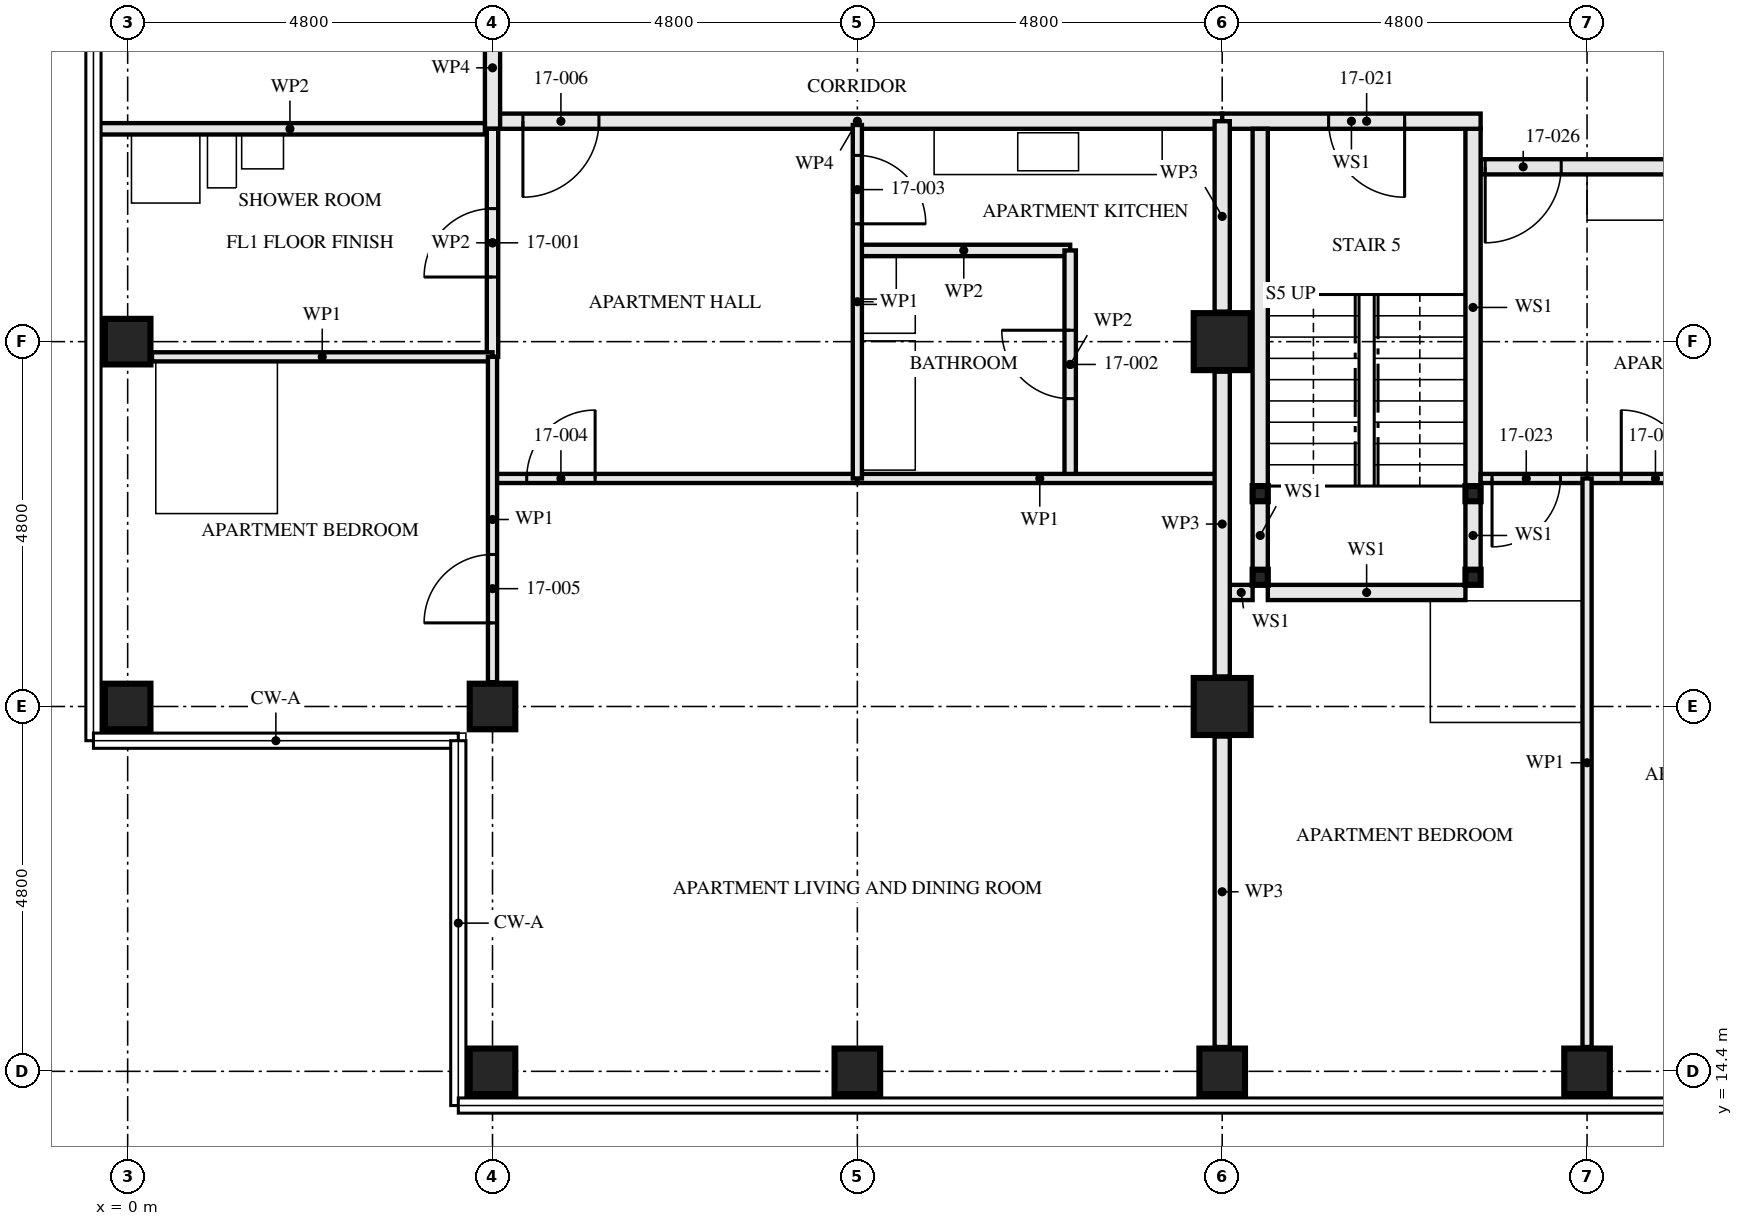
"""IFC4 building model, lengths in metres.
Left out: names, types, materials, properties, quantities, classifications, styles, units other than length and angle.
Written with IfcOpenShell. Run it as: python <this file> out.ifc"""

import sys

from ifc_helpers import new_model, si_unit, direction, frame, frame_2d, origin, origin_2d, place, context, subcontext, project, spatial, rectangle, hollow_rectangle, extrude, element, fill, save


model = new_model("IFC4")
c1 = context("Model", 3, precision=1e-05, world=origin(), true_north=direction((0.0, 1.0)))
c2 = subcontext(c1, "Body", "Model", "MODEL_VIEW")
j1 = project(units=[si_unit("LENGTHUNIT", "METRE"), si_unit("PLANEANGLEUNIT", "RADIAN")], contexts=[c1])
p1 = place(None, origin())
s1 = spatial("IfcSite", under=j1, at=p1, CompositionType="ELEMENT")
p2 = place(p1, origin())
s2 = spatial("IfcBuilding", under=s1, at=p2, CompositionType="ELEMENT")
p3 = place(p2, frame((0.0, 0.0, 65.5)))
s3 = spatial("IfcBuildingStorey", under=s2, at=p3, CompositionType="ELEMENT", Elevation=65.5)
for number, where, z_axis, x_axis in (
    (1, (0.0, 19.2, 0.0), (0.0, 0.0, 1.0), (0.0, 1.0, 0.0)),
    (2, (0.0, 24.0, 0.0), (0.0, 0.0, 1.0), (1.0, 0.0, 0.0)),
    (3, (4.8, 14.4, 0.0), (0.0, 0.0, 1.0), (0.0, 1.0, 0.0)),
    (4, (4.8, 19.2, 0.0), (0.0, 0.0, 1.0), (0.0, 1.0, 0.0)),
    (5, (9.6, 14.4, 0.0), (0.0, 0.0, 1.0), (0.0, 1.0, 0.0)),
    (6, (14.4, 14.4, 0.0), (0.0, 0.0, 1.0), (0.0, 1.0, 0.0)),
):
    element("IfcColumn", number, at=place(p3, frame(where, z_axis=z_axis, x_axis=x_axis)), inside=s3, PredefinedType="COLUMN", context=c2, shape_type="SweptSolid", body=[
        extrude(hollow_rectangle(XDim=0.6, YDim=0.6, WallThickness=0.08, at=origin_2d()), origin(), (0.0, 0.0, 1.0), 3.5),
    ])
for number, where, z_axis, x_axis in (
    (7, (14.4, 19.2, 0.0), (0.0, 0.0, 1.0), (1.0, 0.0, 0.0)),
    (8, (14.4, 24.0, 0.0), (0.0, 0.0, 1.0), (1.0, 0.0, 0.0)),
):
    element("IfcColumn", number, at=place(p3, frame(where, z_axis=z_axis, x_axis=x_axis)), inside=s3, PredefinedType="COLUMN", context=c2, shape_type="SweptSolid", body=[
        extrude(hollow_rectangle(XDim=0.75, YDim=0.75, WallThickness=0.08, at=origin_2d()), origin(), (0.0, 0.0, 1.0), 3.5),
    ])
p4 = place(p3, frame((19.2, 14.4, 0.0), z_axis=(0.0, 0.0, 1.0), x_axis=(0.0, 1.0, 0.0)))
e9 = element("IfcColumn", 9, at=p4, inside=s3, PredefinedType="COLUMN", context=c2, shape_type="SweptSolid", body=[
    extrude(hollow_rectangle(XDim=0.6, YDim=0.6, WallThickness=0.08, at=origin_2d()), origin(), (0.0, 0.0, 1.0), 3.5),
])
for number, where, z_axis, x_axis in (
    (10, (14.9, 20.9, 0.0), (0.0, 0.0, 1.0), (1.0, 0.0, 0.0)),
    (11, (17.7, 20.9, 0.0), (0.0, 0.0, 1.0), (1.0, 0.0, 0.0)),
    (12, (14.9, 22.0, 0.0), (0.0, 0.0, 1.0), (1.0, 0.0, 0.0)),
    (13, (17.7, 22.0, 0.0), (0.0, 0.0, 1.0), (1.0, 0.0, 0.0)),
):
    element("IfcColumn", number, at=place(p3, frame(where, z_axis=z_axis, x_axis=x_axis)), inside=s3, PredefinedType="COLUMN", context=c2, shape_type="SweptSolid", body=[
        extrude(hollow_rectangle(XDim=0.2, YDim=0.2, WallThickness=0.008, at=origin_2d()), origin(), (0.0, 0.0, 1.0), 3.33),
    ])
p5 = place(p3, frame((4.8, 23.8, 0.0), z_axis=(0.0, 0.0, 1.0), x_axis=(0.0, 1.0, 0.0)))
e14 = element("IfcWall", 14, at=p5, inside=s3, PredefinedType="PARTITIONING", context=c2, shape_type="SweptSolid", body=[
    extrude(rectangle(XDim=3.0, YDim=0.15, at=frame_2d((1.5, 0.0))), origin(), (0.0, 0.0, 1.0), 2.55),
])
p6 = place(p5, frame((1.05, 0.0, 0.0)))
e15 = element("IfcOpeningElement", 15, at=p6, cuts=e14, PredefinedType="OPENING", context=c2, shape_type="SweptSolid", body=[
    extrude(rectangle(XDim=0.9, YDim=2.1, at=frame_2d((0.45, 1.05))), frame((0.0, 0.085, 0.0), z_axis=(0.0, -1.0, 0.0), x_axis=(1.0, 0.0, 0.0)), (0.0, 0.0, 1.0), 0.171),
])
p7 = place(p3, frame((12.4, 22.2, 0.0), z_axis=(0.0, 0.0, 1.0), x_axis=(0.0, 1.0, 0.0)))
e16 = element("IfcWall", 16, at=p7, inside=s3, PredefinedType="PARTITIONING", context=c2, shape_type="SweptSolid", body=[
    extrude(rectangle(XDim=3.0, YDim=0.15, at=frame_2d((1.5, 0.0))), origin(), (0.0, 0.0, 1.0), 2.55),
])
p8 = place(p7, frame((1.05, 0.0, 0.0)))
e17 = element("IfcOpeningElement", 17, at=p8, cuts=e16, PredefinedType="OPENING", context=c2, shape_type="SweptSolid", body=[
    extrude(rectangle(XDim=0.9, YDim=2.1, at=frame_2d((0.45, 1.05))), frame((0.0, 0.085, 0.0), z_axis=(0.0, -1.0, 0.0), x_axis=(1.0, 0.0, 0.0)), (0.0, 0.0, 1.0), 0.171),
])
p9 = place(p3, frame((9.6, 25.2, 0.0), z_axis=(0.0, 0.0, 1.0), x_axis=(1.0, 0.0, 0.0)))
e18 = element("IfcWall", 18, at=p9, inside=s3, PredefinedType="PARTITIONING", context=c2, shape_type="SweptSolid", body=[
    extrude(rectangle(XDim=2.8, YDim=0.15, at=frame_2d((1.4, 0.0))), origin(), (0.0, 0.0, 1.0), 3.33),
])
p10 = place(p3, frame((9.6, 22.2, 0.0), z_axis=(0.0, 0.0, 1.0), x_axis=(0.0, 1.0, 0.0)))
e19 = element("IfcWall", 19, at=p10, inside=s3, PredefinedType="PARTITIONING", context=c2, shape_type="SweptSolid", body=[
    extrude(rectangle(XDim=4.65, YDim=0.12, at=frame_2d((2.325, 0.0))), origin(), (0.0, 0.0, 1.0), 2.55),
])
p11 = place(p10, frame((3.35, 0.0, 0.0)))
e20 = element("IfcOpeningElement", 20, at=p11, cuts=e19, PredefinedType="OPENING", context=c2, shape_type="SweptSolid", body=[
    extrude(rectangle(XDim=0.9, YDim=2.1, at=frame_2d((0.45, 1.05))), frame((0.0, 0.071, 0.0), z_axis=(0.0, -1.0, 0.0), x_axis=(1.0, 0.0, 0.0)), (0.0, 0.0, 1.0), 0.141),
])
p12 = place(p3, frame((0.32, 23.8, 0.0), z_axis=(0.0, 0.0, 1.0), x_axis=(1.0, 0.0, 0.0)))
e21 = element("IfcWall", 21, at=p12, inside=s3, PredefinedType="PARTITIONING", context=c2, shape_type="SweptSolid", body=[
    extrude(rectangle(XDim=4.48, YDim=0.12, at=frame_2d((2.24, 0.0))), origin(), (0.0, 0.0, 1.0), 3.33),
])
p13 = place(p3, frame((4.8, 22.2, 0.0), z_axis=(0.0, 0.0, 1.0), x_axis=(1.0, 0.0, 0.0)))
e22 = element("IfcWall", 22, at=p13, inside=s3, PredefinedType="PARTITIONING", context=c2, shape_type="SweptSolid", body=[
    extrude(rectangle(XDim=4.8, YDim=0.12, at=frame_2d((2.4, 0.0))), origin(), (0.0, 0.0, 1.0), 3.33),
])
p14 = place(p13, frame((0.45, 0.0, 0.0)))
e23 = element("IfcOpeningElement", 23, at=p14, cuts=e22, PredefinedType="OPENING", context=c2, shape_type="SweptSolid", body=[
    extrude(rectangle(XDim=0.9, YDim=2.1, at=frame_2d((0.45, 1.05))), frame((0.0, 0.071, 0.0), z_axis=(0.0, -1.0, 0.0), x_axis=(1.0, 0.0, 0.0)), (0.0, 0.0, 1.0), 0.141),
])
p15 = place(p3, frame((9.6, 22.2, 0.0), z_axis=(0.0, 0.0, 1.0), x_axis=(1.0, 0.0, 0.0)))
e24 = element("IfcWall", 24, at=p15, inside=s3, PredefinedType="PARTITIONING", context=c2, shape_type="SweptSolid", body=[
    extrude(rectangle(XDim=4.8, YDim=0.12, at=frame_2d((2.4, 0.0))), origin(), (0.0, 0.0, 1.0), 3.33),
])
p16 = place(p3, frame((4.8, 19.52, 0.0), z_axis=(0.0, 0.0, 1.0), x_axis=(0.0, 1.0, 0.0)))
e25 = element("IfcWall", 25, at=p16, inside=s3, PredefinedType="PARTITIONING", context=c2, shape_type="SweptSolid", body=[
    extrude(rectangle(XDim=4.28, YDim=0.12, at=frame_2d((2.14, 0.0))), origin(), (0.0, 0.0, 1.0), 3.33),
])
p17 = place(p16, frame((0.78, 0.0, 0.0)))
e26 = element("IfcOpeningElement", 26, at=p17, cuts=e25, PredefinedType="OPENING", context=c2, shape_type="SweptSolid", body=[
    extrude(rectangle(XDim=0.9, YDim=2.1, at=frame_2d((0.45, 1.05))), frame((0.0, 0.071, 0.0), z_axis=(0.0, -1.0, 0.0), x_axis=(1.0, 0.0, 0.0)), (0.0, 0.0, 1.0), 0.141),
])
p18 = place(p3, frame((4.8, 26.9, 0.0), z_axis=(0.0, 0.0, 1.0), x_axis=(1.0, 0.0, 0.0)))
e27 = element("IfcWall", 27, at=p18, inside=s3, PredefinedType="PARTITIONING", context=c2, shape_type="SweptSolid", body=[
    extrude(rectangle(XDim=9.6, YDim=0.2, at=frame_2d((4.8, 0.0))), origin(), (0.0, 0.0, 1.0), 3.33),
])
p19 = place(p18, frame((0.4, 0.0, 0.0)))
e28 = element("IfcOpeningElement", 28, at=p19, cuts=e27, PredefinedType="OPENING", context=c2, shape_type="SweptSolid", body=[
    extrude(rectangle(XDim=1.0, YDim=2.1, at=frame_2d((0.5, 1.05))), frame((0.0, 0.111, 0.0), z_axis=(0.0, -1.0, 0.0), x_axis=(1.0, 0.0, 0.0)), (0.0, 0.0, 1.0), 0.221),
])
p20 = place(p3, frame((4.8, 26.8, 0.0), z_axis=(0.0, 0.0, 1.0), x_axis=(0.0, 1.0, 0.0)))
e29 = element("IfcWall", 29, at=p20, inside=s3, PredefinedType="PARTITIONING", context=c2, shape_type="SweptSolid", body=[
    extrude(rectangle(XDim=1.605, YDim=0.2, at=frame_2d((0.802, 0.0))), origin(), (0.0, 0.0, 1.0), 3.33),
])
p21 = place(p3, frame((14.9, 21.0, 0.0), z_axis=(0.0, 0.0, 1.0), x_axis=(0.0, 1.0, 0.0)))
e30 = element("IfcWall", 30, at=p21, inside=s3, PredefinedType="SOLIDWALL", context=c2, shape_type="SweptSolid", body=[
    extrude(rectangle(XDim=0.9, YDim=0.2, at=frame_2d((0.45, 0.0))), origin(), (0.0, 0.0, 1.0), 2.99),
])
p22 = place(p3, frame((14.9, 22.1, 0.0), z_axis=(0.0, 0.0, 1.0), x_axis=(0.0, 1.0, 0.0)))
e31 = element("IfcWall", 31, at=p22, inside=s3, PredefinedType="SOLIDWALL", context=c2, shape_type="SweptSolid", body=[
    extrude(rectangle(XDim=4.7, YDim=0.2, at=frame_2d((2.35, 0.0))), origin(), (0.0, 0.0, 1.0), 2.99),
])
p23 = place(p3, frame((17.7, 21.0, 0.0), z_axis=(0.0, 0.0, 1.0), x_axis=(0.0, 1.0, 0.0)))
e32 = element("IfcWall", 32, at=p23, inside=s3, PredefinedType="SOLIDWALL", context=c2, shape_type="SweptSolid", body=[
    extrude(rectangle(XDim=0.9, YDim=0.2, at=frame_2d((0.45, 0.0))), origin(), (0.0, 0.0, 1.0), 2.99),
])
p24 = place(p3, frame((17.7, 22.1, 0.0), z_axis=(0.0, 0.0, 1.0), x_axis=(0.0, 1.0, 0.0)))
e33 = element("IfcWall", 33, at=p24, inside=s3, PredefinedType="SOLIDWALL", context=c2, shape_type="SweptSolid", body=[
    extrude(rectangle(XDim=4.7, YDim=0.2, at=frame_2d((2.35, 0.0))), origin(), (0.0, 0.0, 1.0), 2.99),
])
p25 = place(p3, frame((14.5, 20.7, 0.0), z_axis=(0.0, 0.0, 1.0), x_axis=(1.0, 0.0, 0.0)))
e34 = element("IfcWall", 34, at=p25, inside=s3, PredefinedType="SOLIDWALL", context=c2, shape_type="SweptSolid", body=[
    extrude(rectangle(XDim=0.3, YDim=0.2, at=frame_2d((0.15, 0.0))), origin(), (0.0, 0.0, 1.0), 3.33),
])
p26 = place(p3, frame((15.0, 20.7, 0.0), z_axis=(0.0, 0.0, 1.0), x_axis=(1.0, 0.0, 0.0)))
e35 = element("IfcWall", 35, at=p26, inside=s3, PredefinedType="SOLIDWALL", context=c2, shape_type="SweptSolid", body=[
    extrude(rectangle(XDim=2.6, YDim=0.2, at=frame_2d((1.3, 0.0))), origin(), (0.0, 0.0, 1.0), 3.33),
])
p27 = place(p3, frame((14.4, 26.9, 0.0), z_axis=(0.0, 0.0, 1.0), x_axis=(1.0, 0.0, 0.0)))
e36 = element("IfcWall", 36, at=p27, inside=s3, PredefinedType="SOLIDWALL", context=c2, shape_type="SweptSolid", body=[
    extrude(rectangle(XDim=3.4, YDim=0.2, at=frame_2d((1.7, 0.0))), origin(), (0.0, 0.0, 1.0), 3.33),
])
p28 = place(p27, frame((1.4, 0.0, 0.0)))
e37 = element("IfcOpeningElement", 37, at=p28, cuts=e36, PredefinedType="OPENING", context=c2, shape_type="SweptSolid", body=[
    extrude(rectangle(XDim=1.0, YDim=2.1, at=frame_2d((0.5, 1.05))), frame((0.0, 0.111, 0.0), z_axis=(0.0, -1.0, 0.0), x_axis=(1.0, 0.0, 0.0)), (0.0, 0.0, 1.0), 0.221),
])
p29 = place(p3, frame((17.8, 22.2, 0.0), z_axis=(0.0, 0.0, 1.0), x_axis=(1.0, 0.0, 0.0)))
e38 = element("IfcWall", 38, at=p29, inside=s3, PredefinedType="PARTITIONING", context=c2, shape_type="SweptSolid", body=[
    extrude(rectangle(XDim=1.4, YDim=0.12, at=frame_2d((0.7, 0.0))), origin(), (0.0, 0.0, 1.0), 3.33),
])
p30 = place(p29, frame((0.15, 0.0, 0.0)))
e39 = element("IfcOpeningElement", 39, at=p30, cuts=e38, PredefinedType="OPENING", context=c2, shape_type="SweptSolid", body=[
    extrude(rectangle(XDim=0.9, YDim=2.1, at=frame_2d((0.45, 1.05))), frame((0.0, 0.071, 0.0), z_axis=(0.0, -1.0, 0.0), x_axis=(1.0, 0.0, 0.0)), (0.0, 0.0, 1.0), 0.141),
])
p31 = place(p3, frame((19.2, 22.2, 0.0), z_axis=(0.0, 0.0, 1.0), x_axis=(1.0, 0.0, 0.0)))
e40 = element("IfcWall", 40, at=p31, inside=s3, PredefinedType="PARTITIONING", context=c2, shape_type="SweptSolid", body=[
    extrude(rectangle(XDim=4.8, YDim=0.12, at=frame_2d((2.4, 0.0))), origin(), (0.0, 0.0, 1.0), 3.33),
])
p32 = place(p31, frame((0.45, 0.0, 0.0)))
e41 = element("IfcOpeningElement", 41, at=p32, cuts=e40, PredefinedType="OPENING", context=c2, shape_type="SweptSolid", body=[
    extrude(rectangle(XDim=0.9, YDim=2.1, at=frame_2d((0.45, 1.05))), frame((0.0, 0.071, 0.0), z_axis=(0.0, -1.0, 0.0), x_axis=(1.0, 0.0, 0.0)), (0.0, 0.0, 1.0), 0.141),
])
p33 = place(p3, frame((19.2, 14.72, 0.0), z_axis=(0.0, 0.0, 1.0), x_axis=(0.0, 1.0, 0.0)))
e42 = element("IfcWall", 42, at=p33, inside=s3, PredefinedType="PARTITIONING", context=c2, shape_type="SweptSolid", body=[
    extrude(rectangle(XDim=7.48, YDim=0.12, at=frame_2d((3.74, 0.0))), origin(), (0.0, 0.0, 1.0), 2.55),
])
p34 = place(p3, frame((17.8, 26.3, 0.0), z_axis=(0.0, 0.0, 1.0), x_axis=(1.0, 0.0, 0.0)))
e43 = element("IfcWall", 43, at=p34, inside=s3, PredefinedType="PARTITIONING", context=c2, shape_type="SweptSolid", body=[
    extrude(rectangle(XDim=11.0, YDim=0.2, at=frame_2d((5.5, 0.0))), origin(), (0.0, 0.0, 1.0), 2.55),
])
p35 = place(p34, frame((0.06, 0.0, 0.0)))
e44 = element("IfcOpeningElement", 44, at=p35, cuts=e43, PredefinedType="OPENING", context=c2, shape_type="SweptSolid", body=[
    extrude(rectangle(XDim=1.0, YDim=2.1, at=frame_2d((0.5, 1.05))), frame((0.0, 0.111, 0.0), z_axis=(0.0, -1.0, 0.0), x_axis=(1.0, 0.0, 0.0)), (0.0, 0.0, 1.0), 0.221),
])
p36 = place(p3, frame((14.4, 14.72, 0.0), z_axis=(0.0, 0.0, 1.0), x_axis=(0.0, 1.0, 0.0)))
e45 = element("IfcWall", 45, at=p36, inside=s3, PredefinedType="PARTITIONING", context=c2, shape_type="SweptSolid", body=[
    extrude(rectangle(XDim=4.085, YDim=0.2, at=frame_2d((2.042, 0.0))), origin(), (0.0, 0.0, 1.0), 2.32),
])
p37 = place(p3, frame((14.4, 19.595, 0.0), z_axis=(0.0, 0.0, 1.0), x_axis=(0.0, 1.0, 0.0)))
e46 = element("IfcWall", 46, at=p37, inside=s3, PredefinedType="PARTITIONING", context=c2, shape_type="SweptSolid", body=[
    extrude(rectangle(XDim=4.01, YDim=0.2, at=frame_2d((2.005, 0.0))), origin(), (0.0, 0.0, 1.0), 2.32),
])
p38 = place(p3, frame((14.4, 24.395, 0.0), z_axis=(0.0, 0.0, 1.0), x_axis=(0.0, 1.0, 0.0)))
e47 = element("IfcWall", 47, at=p38, inside=s3, PredefinedType="PARTITIONING", context=c2, shape_type="SweptSolid", body=[
    extrude(rectangle(XDim=2.505, YDim=0.2, at=frame_2d((1.252, 0.0))), origin(), (0.0, 0.0, 1.0), 2.32),
])
p39 = place(p3, frame((-0.43, 26.8, 0.0), z_axis=(0.0, 0.0, 1.0), x_axis=(1.0, 0.0, 0.0)))
e48 = element("IfcWall", 48, at=p39, inside=s3, PredefinedType="PARTITIONING", context=c2, shape_type="SweptSolid", body=[
    extrude(rectangle(XDim=5.13, YDim=0.15, at=frame_2d((2.565, 0.0))), origin(), (0.0, 0.0, 1.0), 2.32),
])
p40 = place(p6, origin())
e49 = element("IfcDoor", 49, at=p40, inside=s3, OperationType="SINGLE_SWING_RIGHT", PredefinedType="DOOR", context=c2, shape_type="SweptSolid", body=[
    extrude(rectangle(XDim=0.9, YDim=2.1, at=frame_2d((0.45, 1.05))), frame((0.0, 0.022, 0.0), z_axis=(0.0, -1.0, 0.0), x_axis=(1.0, 0.0, 0.0)), (0.0, 0.0, 1.0), 0.044),
])
fill(e15, e49)
p41 = place(p8, origin())
e50 = element("IfcDoor", 50, at=p41, inside=s3, OperationType="SINGLE_SWING_LEFT", PredefinedType="DOOR", context=c2, shape_type="SweptSolid", body=[
    extrude(rectangle(XDim=0.9, YDim=2.1, at=frame_2d((0.45, 1.05))), frame((0.0, 0.022, 0.0), z_axis=(0.0, -1.0, 0.0), x_axis=(1.0, 0.0, 0.0)), (0.0, 0.0, 1.0), 0.044),
])
fill(e17, e50)
p42 = place(p11, frame((0.9, 0.0, 0.0), z_axis=(0.0, 0.0, 1.0), x_axis=(-1.0, 0.0, 0.0)))
e51 = element("IfcDoor", 51, at=p42, inside=s3, OperationType="SINGLE_SWING_LEFT", PredefinedType="DOOR", context=c2, shape_type="SweptSolid", body=[
    extrude(rectangle(XDim=0.9, YDim=2.1, at=frame_2d((0.45, 1.05))), frame((0.0, 0.022, 0.0), z_axis=(0.0, -1.0, 0.0), x_axis=(1.0, 0.0, 0.0)), (0.0, 0.0, 1.0), 0.044),
])
fill(e20, e51)
p43 = place(p14, origin())
e52 = element("IfcDoor", 52, at=p43, inside=s3, OperationType="SINGLE_SWING_LEFT", PredefinedType="DOOR", context=c2, shape_type="SweptSolid", body=[
    extrude(rectangle(XDim=0.9, YDim=2.1, at=frame_2d((0.45, 1.05))), frame((0.0, 0.022, 0.0), z_axis=(0.0, -1.0, 0.0), x_axis=(1.0, 0.0, 0.0)), (0.0, 0.0, 1.0), 0.044),
])
fill(e23, e52)
p44 = place(p17, origin())
e53 = element("IfcDoor", 53, at=p44, inside=s3, OperationType="SINGLE_SWING_RIGHT", PredefinedType="DOOR", context=c2, shape_type="SweptSolid", body=[
    extrude(rectangle(XDim=0.9, YDim=2.1, at=frame_2d((0.45, 1.05))), frame((0.0, 0.022, 0.0), z_axis=(0.0, -1.0, 0.0), x_axis=(1.0, 0.0, 0.0)), (0.0, 0.0, 1.0), 0.044),
])
fill(e26, e53)
p45 = place(p19, frame((1.0, 0.0, 0.0), z_axis=(0.0, 0.0, 1.0), x_axis=(-1.0, 0.0, 0.0)))
e54 = element("IfcDoor", 54, at=p45, inside=s3, OperationType="SINGLE_SWING_LEFT", PredefinedType="DOOR", context=c2, shape_type="SweptSolid", body=[
    extrude(rectangle(XDim=1.0, YDim=2.1, at=frame_2d((0.5, 1.05))), frame((0.0, 0.027, 0.0), z_axis=(0.0, -1.0, 0.0), x_axis=(1.0, 0.0, 0.0)), (0.0, 0.0, 1.0), 0.054),
])
fill(e28, e54)
p46 = place(p28, frame((1.0, 0.0, 0.0), z_axis=(0.0, 0.0, 1.0), x_axis=(-1.0, 0.0, 0.0)))
e55 = element("IfcDoor", 55, at=p46, inside=s3, OperationType="SINGLE_SWING_RIGHT", PredefinedType="DOOR", context=c2, shape_type="SweptSolid", body=[
    extrude(rectangle(XDim=1.0, YDim=2.1, at=frame_2d((0.5, 1.05))), frame((0.0, 0.032, 0.0), z_axis=(0.0, -1.0, 0.0), x_axis=(1.0, 0.0, 0.0)), (0.0, 0.0, 1.0), 0.064),
])
fill(e37, e55)
p47 = place(p30, frame((0.9, 0.0, 0.0), z_axis=(0.0, 0.0, 1.0), x_axis=(-1.0, 0.0, 0.0)))
e56 = element("IfcDoor", 56, at=p47, inside=s3, OperationType="SINGLE_SWING_LEFT", PredefinedType="DOOR", context=c2, shape_type="SweptSolid", body=[
    extrude(rectangle(XDim=0.9, YDim=2.1, at=frame_2d((0.45, 1.05))), frame((0.0, 0.022, 0.0), z_axis=(0.0, -1.0, 0.0), x_axis=(1.0, 0.0, 0.0)), (0.0, 0.0, 1.0), 0.044),
])
fill(e39, e56)
p48 = place(p32, origin())
e57 = element("IfcDoor", 57, at=p48, inside=s3, OperationType="SINGLE_SWING_RIGHT", PredefinedType="DOOR", context=c2, shape_type="SweptSolid", body=[
    extrude(rectangle(XDim=0.9, YDim=2.1, at=frame_2d((0.45, 1.05))), frame((0.0, 0.022, 0.0), z_axis=(0.0, -1.0, 0.0), x_axis=(1.0, 0.0, 0.0)), (0.0, 0.0, 1.0), 0.044),
])
fill(e41, e57)
p49 = place(p35, frame((1.0, 0.0, 0.0), z_axis=(0.0, 0.0, 1.0), x_axis=(-1.0, 0.0, 0.0)))
e58 = element("IfcDoor", 58, at=p49, inside=s3, OperationType="SINGLE_SWING_LEFT", PredefinedType="DOOR", context=c2, shape_type="SweptSolid", body=[
    extrude(rectangle(XDim=1.0, YDim=2.1, at=frame_2d((0.5, 1.05))), frame((0.0, 0.027, 0.0), z_axis=(0.0, -1.0, 0.0), x_axis=(1.0, 0.0, 0.0)), (0.0, 0.0, 1.0), 0.054),
])
fill(e44, e58)
save(model, sys.argv[1])
